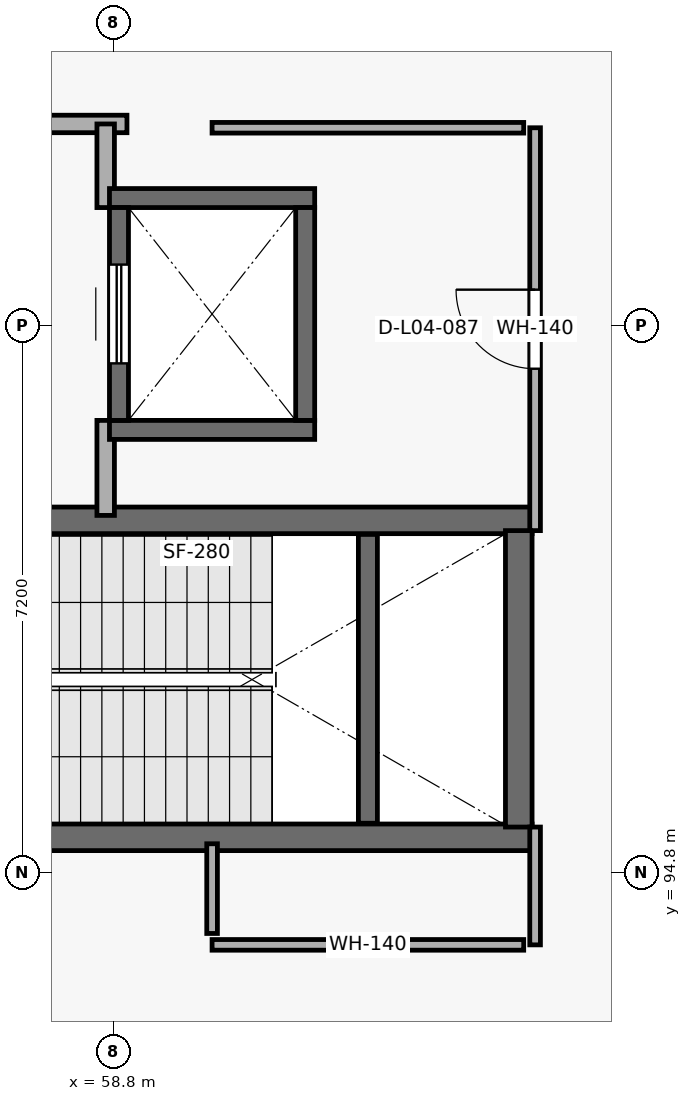
"""IFC4 building model, lengths in metres.
Left out: names, types, materials, properties, quantities, classifications, styles, units other than length and angle.
Written with IfcOpenShell. Run it as: python <this file> out.ifc"""

import sys

from ifc_helpers import new_model, si_unit, direction, frame, frame_2d, origin, place, context, subcontext, project, spatial, rectangle, extrude, element, fill, save


model = new_model("IFC4")
c1 = context("Model", 3, precision=1e-05, world=origin(), true_north=direction((0.0, 1.0)))
c2 = subcontext(c1, "Body", "Model", "MODEL_VIEW")
j1 = project(units=[si_unit("LENGTHUNIT", "METRE"), si_unit("PLANEANGLEUNIT", "RADIAN")], contexts=[c1])
p1 = place(None, origin())
s1 = spatial("IfcSite", under=j1, at=p1, CompositionType="ELEMENT")
p2 = place(p1, origin())
s2 = spatial("IfcBuilding", under=s1, at=p2, CompositionType="ELEMENT")
p3 = place(p2, frame((0.0, 0.0, 15.3)))
s3 = spatial("IfcBuildingStorey", under=s2, at=p3, CompositionType="ELEMENT", Elevation=15.3)
p4 = place(p3, frame((55.09, 95.265, 0.0), z_axis=(0.0, 0.0, 1.0), x_axis=(1.0, 0.0, 0.0)))
e1 = element("IfcWall", 1, at=p4, inside=s3, PredefinedType="SHEAR", context=c2, shape_type="SweptSolid", body=[
    extrude(rectangle(XDim=9.22, YDim=0.35, at=frame_2d((4.61, 0.0))), origin(), (0.0, 0.0, 1.0), 4.82),
])
p5 = place(p4, frame((0.45, 0.0, 0.0)))
e2 = element("IfcOpeningElement", 2, at=p5, cuts=e1, PredefinedType="OPENING", context=c2, shape_type="SweptSolid", body=[
    extrude(rectangle(XDim=1.25, YDim=2.2, at=frame_2d((0.625, 1.1))), frame((0.0, 0.185, 0.0), z_axis=(0.0, -1.0, 0.0), x_axis=(1.0, 0.0, 0.0)), (0.0, 0.0, 1.0), 0.37),
])
p6 = place(p3, frame((64.31, 99.435, 0.0), z_axis=(0.0, 0.0, 1.0), x_axis=(-1.0, 0.0, 0.0)))
e3 = element("IfcWall", 3, at=p6, inside=s3, PredefinedType="SHEAR", context=c2, shape_type="SweptSolid", body=[
    extrude(rectangle(XDim=9.22, YDim=0.35, at=frame_2d((4.61, 0.0))), origin(), (0.0, 0.0, 1.0), 4.82),
])
p7 = place(p6, frame((7.72, 0.0, 0.0)))
e4 = element("IfcOpeningElement", 4, at=p7, cuts=e3, PredefinedType="OPENING", context=c2, shape_type="SweptSolid", body=[
    extrude(rectangle(XDim=1.2, YDim=2.2, at=frame_2d((0.6, 1.1))), frame((0.0, 0.185, 0.0), z_axis=(0.0, -1.0, 0.0), x_axis=(1.0, 0.0, 0.0)), (0.0, 0.0, 1.0), 0.37),
])
p8 = place(p3, frame((64.135, 99.3, 0.0), z_axis=(0.0, 0.0, 1.0), x_axis=(0.0, -1.0, 0.0)))
e5 = element("IfcWall", 5, at=p8, inside=s3, PredefinedType="SHEAR", context=c2, shape_type="SweptSolid", body=[
    extrude(rectangle(XDim=3.9, YDim=0.35, at=frame_2d((1.95, 0.0))), origin(), (0.0, 0.0, 1.0), 4.82),
])
p9 = place(p3, frame((62.15, 95.45, 0.0), z_axis=(0.0, 0.0, 1.0), x_axis=(0.0, 1.0, 0.0)))
e6 = element("IfcWall", 6, at=p9, inside=s3, PredefinedType="SHEAR", context=c2, shape_type="SweptSolid", body=[
    extrude(rectangle(XDim=3.8, YDim=0.25, at=frame_2d((1.9, 0.0))), origin(), (0.0, 0.0, 1.0), 2.37),
])
p10 = place(p3, frame((55.09, 104.65, 0.0), z_axis=(0.0, 0.0, 1.0), x_axis=(1.0, 0.0, 0.0)))
e7 = element("IfcWall", 7, at=p10, inside=s3, PredefinedType="PARTITIONING", context=c2, shape_type="SweptSolid", body=[
    extrude(rectangle(XDim=3.89, YDim=0.23, at=frame_2d((1.945, 0.0))), origin(), (0.0, 0.0, 1.0), 4.82),
])
p11 = place(p10, frame((1.15, 0.0, 0.0)))
e8 = element("IfcOpeningElement", 8, at=p11, cuts=e7, PredefinedType="OPENING", context=c2, shape_type="SweptSolid", body=[
    extrude(rectangle(XDim=1.2, YDim=2.2, at=frame_2d((0.6, 1.1))), frame((0.0, 0.125, 0.0), z_axis=(0.0, -1.0, 0.0), x_axis=(1.0, 0.0, 0.0)), (0.0, 0.0, 1.0), 0.25),
])
p12 = place(p3, frame((58.7, 104.65, 0.0), z_axis=(0.0, 0.0, 1.0), x_axis=(0.0, -1.0, 0.0)))
e9 = element("IfcWall", 9, at=p12, inside=s3, PredefinedType="PARTITIONING", context=c2, shape_type="SweptSolid", body=[
    extrude(rectangle(XDim=1.1, YDim=0.23, at=frame_2d((0.55, 0.0))), origin(), (0.0, 0.0, 1.0), 4.82),
])
p13 = place(p3, frame((58.7, 100.75, 0.0), z_axis=(0.0, 0.0, 1.0), x_axis=(0.0, -1.0, 0.0)))
e10 = element("IfcWall", 10, at=p13, inside=s3, PredefinedType="PARTITIONING", context=c2, shape_type="SweptSolid", body=[
    extrude(rectangle(XDim=1.25, YDim=0.23, at=frame_2d((0.625, 0.0))), origin(), (0.0, 0.0, 1.0), 4.82),
])
for number, where, z_axis, x_axis in (
    (11, (58.75, 100.625, 0.0), (0.0, 0.0, 1.0), (1.0, 0.0, 0.0)),
    (12, (61.45, 103.675, 0.0), (0.0, 0.0, 1.0), (-1.0, 0.0, 0.0)),
):
    element("IfcWall", number, at=place(p3, frame(where, z_axis=z_axis, x_axis=x_axis)), inside=s3, PredefinedType="SHEAR", context=c2, shape_type="SweptSolid", body=[
        extrude(rectangle(XDim=2.7, YDim=0.25, at=frame_2d((1.35, 0.0))), origin(), (0.0, 0.0, 1.0), 4.82),
    ])
p14 = place(p3, frame((58.875, 100.75, 0.0), z_axis=(0.0, 0.0, 1.0), x_axis=(0.0, 1.0, 0.0)))
e13 = element("IfcWall", 13, at=p14, inside=s3, PredefinedType="SHEAR", context=c2, shape_type="SweptSolid", body=[
    extrude(rectangle(XDim=2.8, YDim=0.25, at=frame_2d((1.4, 0.0))), origin(), (0.0, 0.0, 1.0), 4.82),
])
p15 = place(p14, frame((0.75, 0.0, 0.0)))
e14 = element("IfcOpeningElement", 14, at=p15, cuts=e13, PredefinedType="OPENING", context=c2, shape_type="SweptSolid", body=[
    extrude(rectangle(XDim=1.3, YDim=2.25, at=frame_2d((0.65, 1.125))), frame((0.0, 0.135, 0.0), z_axis=(0.0, -1.0, 0.0), x_axis=(1.0, 0.0, 0.0)), (0.0, 0.0, 1.0), 0.27),
])
p16 = place(p3, frame((61.325, 103.55, 0.0), z_axis=(0.0, 0.0, 1.0), x_axis=(0.0, -1.0, 0.0)))
e15 = element("IfcWall", 15, at=p16, inside=s3, PredefinedType="SHEAR", context=c2, shape_type="SweptSolid", body=[
    extrude(rectangle(XDim=2.8, YDim=0.25, at=frame_2d((1.4, 0.0))), origin(), (0.0, 0.0, 1.0), 4.82),
])
p17 = place(p3, frame((64.35, 104.6, 0.0), z_axis=(0.0, 0.0, 1.0), x_axis=(0.0, -1.0, 0.0)))
e16 = element("IfcWall", 16, at=p17, inside=s3, PredefinedType="PARTITIONING", context=c2, shape_type="SweptSolid", body=[
    extrude(rectangle(XDim=5.3, YDim=0.14, at=frame_2d((2.65, 0.0))), origin(), (0.0, 0.0, 1.0), 4.82),
])
p18 = place(p17, frame((2.13, 0.0, 0.0)))
e17 = element("IfcOpeningElement", 17, at=p18, cuts=e16, PredefinedType="OPENING", context=c2, shape_type="SweptSolid", body=[
    extrude(rectangle(XDim=1.04, YDim=2.26, at=frame_2d((0.52, 1.13))), frame((0.0, 0.08, 0.0), z_axis=(0.0, -1.0, 0.0), x_axis=(1.0, 0.0, 0.0)), (0.0, 0.0, 1.0), 0.16),
])
p19 = place(p3, frame((64.35, 95.4, 0.0), z_axis=(0.0, 0.0, 1.0), x_axis=(0.0, -1.0, 0.0)))
e18 = element("IfcWall", 18, at=p19, inside=s3, PredefinedType="PARTITIONING", context=c2, shape_type="SweptSolid", body=[
    extrude(rectangle(XDim=1.55, YDim=0.14, at=frame_2d((0.775, 0.0))), origin(), (0.0, 0.0, 1.0), 4.82),
])
for number, where, z_axis, x_axis in (
    (19, (60.1, 104.6, 0.0), (0.0, 0.0, 1.0), (1.0, 0.0, 0.0)),
    (20, (64.2, 93.85, 0.0), (0.0, 0.0, 1.0), (-1.0, 0.0, 0.0)),
):
    element("IfcWall", number, at=place(p3, frame(where, z_axis=z_axis, x_axis=x_axis)), inside=s3, PredefinedType="PARTITIONING", context=c2, shape_type="SweptSolid", body=[
        extrude(rectangle(XDim=4.1, YDim=0.14, at=frame_2d((2.05, 0.0))), origin(), (0.0, 0.0, 1.0), 4.82),
    ])
p20 = place(p3, frame((60.1, 94.0, 0.0), z_axis=(0.0, 0.0, 1.0), x_axis=(0.0, 1.0, 0.0)))
e21 = element("IfcWall", 21, at=p20, inside=s3, PredefinedType="PARTITIONING", context=c2, shape_type="SweptSolid", body=[
    extrude(rectangle(XDim=1.18, YDim=0.14, at=frame_2d((0.59, 0.0))), origin(), (0.0, 0.0, 1.0), 4.82),
])
p21 = place(p15, origin())
e22 = element("IfcDoor", 22, at=p21, inside=s3, OperationType="SLIDING_TO_LEFT", PredefinedType="DOOR", context=c2, shape_type="SweptSolid", body=[
    extrude(rectangle(XDim=1.3, YDim=2.25, at=frame_2d((0.65, 1.125))), frame((0.0, 0.025, 0.0), z_axis=(0.0, -1.0, 0.0), x_axis=(1.0, 0.0, 0.0)), (0.0, 0.0, 1.0), 0.05),
])
fill(e14, e22)
p22 = place(p18, origin())
e23 = element("IfcDoor", 23, at=p22, inside=s3, OperationType="SINGLE_SWING_RIGHT", PredefinedType="DOOR", context=c2, shape_type="SweptSolid", body=[
    extrude(rectangle(XDim=1.04, YDim=2.26, at=frame_2d((0.52, 1.13))), frame((0.0, 0.025, 0.0), z_axis=(0.0, -1.0, 0.0), x_axis=(1.0, 0.0, 0.0)), (0.0, 0.0, 1.0), 0.05),
])
fill(e17, e23)
save(model, sys.argv[1])
